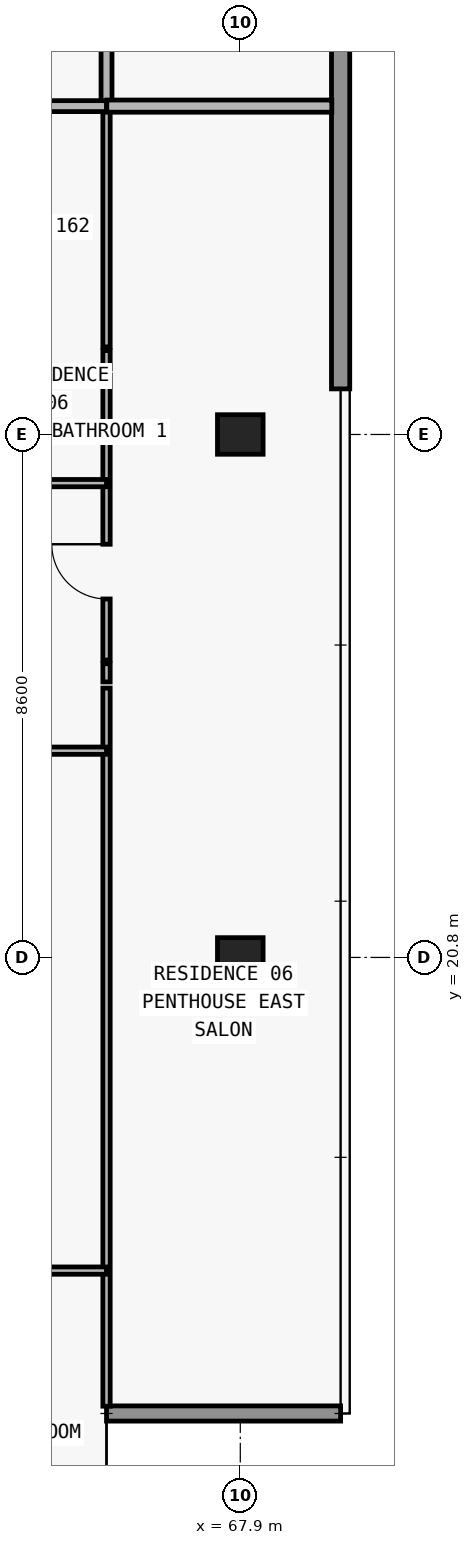
"""IFC4 building model, lengths in metres.
Left out: names, types, materials, properties, quantities, classifications, styles, units other than length and angle.
Written with IfcOpenShell. Run it as: python <this file> out.ifc"""

import sys

from ifc_helpers import new_model, si_unit, direction, frame, frame_2d, origin, origin_2d, place, context, subcontext, project, spatial, rectangle, extrude, element, fill, save


model = new_model("IFC4")
c1 = context("Model", 3, precision=1e-05, world=origin(), true_north=direction((0.0, 1.0)))
c2 = subcontext(c1, "Body", "Model", "MODEL_VIEW")
j1 = project(units=[si_unit("LENGTHUNIT", "METRE"), si_unit("PLANEANGLEUNIT", "RADIAN")], contexts=[c1])
p1 = place(None, origin())
s1 = spatial("IfcSite", under=j1, at=p1, CompositionType="ELEMENT")
p2 = place(p1, origin())
s2 = spatial("IfcBuilding", under=s1, at=p2, CompositionType="ELEMENT")
p3 = place(p2, frame((0.0, 0.0, 266.1)))
s3 = spatial("IfcBuildingStorey", under=s2, at=p3, CompositionType="ELEMENT", Elevation=266.1)
for number, where, z_axis, x_axis in (
    (1, (67.9, 20.8, 0.0), (0.0, 0.0, 1.0), (1.0, 0.0, 0.0)),
    (2, (67.9, 29.4, 0.0), (0.0, 0.0, 1.0), (1.0, 0.0, 0.0)),
):
    element("IfcColumn", number, at=place(p3, frame(where, z_axis=z_axis, x_axis=x_axis)), inside=s3, PredefinedType="COLUMN", context=c2, shape_type="SweptSolid", body=[
        extrude(rectangle(XDim=0.75, YDim=0.65, at=origin_2d()), origin(), (0.0, 0.0, 1.0), 3.0),
    ])
p4 = place(p3, frame((65.7, 13.3, 0.0), z_axis=(0.0, 0.0, 1.0), x_axis=(1.0, 0.0, 0.0)))
e3 = element("IfcWall", 3, at=p4, inside=s3, PredefinedType="ELEMENTEDWALL", context=c2, shape_type="SweptSolid", body=[
    extrude(rectangle(XDim=3.85, YDim=0.25, at=frame_2d((1.925, 0.0))), origin(), (0.0, 0.0, 1.0), 3.0),
])
p5 = place(p3, frame((69.55, 47.0, 0.0), z_axis=(0.0, 0.0, 1.0), x_axis=(0.0, -1.0, 0.0)))
e4 = element("IfcWall", 4, at=p5, inside=s3, PredefinedType="STANDARD", context=c2, shape_type="SweptSolid", body=[
    extrude(rectangle(XDim=16.85, YDim=0.3, at=frame_2d((8.425, 0.0))), origin(), (0.0, 0.0, 1.0), 3.0),
])
p6 = place(p3, frame((65.7, 13.42, 0.0), z_axis=(0.0, 0.0, 1.0), x_axis=(0.0, 1.0, 0.0)))
e5 = element("IfcWall", 5, at=p6, inside=s3, PredefinedType="PARTITIONING", context=c2, shape_type="SweptSolid", body=[
    extrude(rectangle(XDim=11.81, YDim=0.12, at=frame_2d((5.905, 0.0))), origin(), (0.0, 0.0, 1.0), 3.0),
])
p7 = place(p3, frame((65.7, 25.33, 0.0), z_axis=(0.0, 0.0, 1.0), x_axis=(0.0, 1.0, 0.0)))
e6 = element("IfcWall", 6, at=p7, inside=s3, PredefinedType="PARTITIONING", context=c2, shape_type="SweptSolid", body=[
    extrude(rectangle(XDim=0.3, YDim=0.12, at=frame_2d((0.15, 0.0))), origin(), (0.0, 0.0, 1.0), 3.0),
])
p8 = place(p3, frame((65.7, 25.69, 0.0), z_axis=(0.0, 0.0, 1.0), x_axis=(0.0, 1.0, 0.0)))
e7 = element("IfcWall", 7, at=p8, inside=s3, PredefinedType="PARTITIONING", context=c2, shape_type="SweptSolid", body=[
    extrude(rectangle(XDim=4.69, YDim=0.12, at=frame_2d((2.345, 0.0))), origin(), (0.0, 0.0, 1.0), 3.0),
])
p9 = place(p8, frame((1.005, 0.0, 0.0)))
e8 = element("IfcOpeningElement", 8, at=p9, cuts=e7, PredefinedType="OPENING", context=c2, shape_type="SweptSolid", body=[
    extrude(rectangle(XDim=0.9, YDim=2.15, at=frame_2d((0.45, 1.075))), frame((0.0, 0.07, 0.0), z_axis=(0.0, -1.0, 0.0), x_axis=(1.0, 0.0, 0.0)), (0.0, 0.0, 1.0), 0.14),
])
p10 = place(p3, frame((65.7, 30.48, 0.0), z_axis=(0.0, 0.0, 1.0), x_axis=(0.0, 1.0, 0.0)))
e9 = element("IfcWall", 9, at=p10, inside=s3, PredefinedType="PARTITIONING", context=c2, shape_type="SweptSolid", body=[
    extrude(rectangle(XDim=0.3, YDim=0.12, at=frame_2d((0.15, 0.0))), origin(), (0.0, 0.0, 1.0), 3.0),
])
p11 = place(p3, frame((65.7, 30.84, 0.0), z_axis=(0.0, 0.0, 1.0), x_axis=(0.0, 1.0, 0.0)))
e10 = element("IfcWall", 10, at=p11, inside=s3, PredefinedType="PARTITIONING", context=c2, shape_type="SweptSolid", body=[
    extrude(rectangle(XDim=3.96, YDim=0.12, at=frame_2d((1.98, 0.0))), origin(), (0.0, 0.0, 1.0), 3.0),
])
p12 = place(p3, frame((65.7, 34.805, 0.0), z_axis=(0.0, 0.0, 1.0), x_axis=(0.0, 1.0, 0.0)))
e11 = element("IfcWall", 11, at=p12, inside=s3, PredefinedType="PARTITIONING", context=c2, shape_type="SweptSolid", body=[
    extrude(rectangle(XDim=2.195, YDim=0.18, at=frame_2d((1.098, 0.0))), origin(), (0.0, 0.0, 1.0), 3.0),
])
p13 = place(p3, frame((59.5, 15.65, 0.0), z_axis=(0.0, 0.0, 1.0), x_axis=(1.0, 0.0, 0.0)))
e12 = element("IfcWall", 12, at=p13, inside=s3, PredefinedType="PARTITIONING", context=c2, shape_type="SweptSolid", body=[
    extrude(rectangle(XDim=6.2, YDim=0.12, at=frame_2d((3.1, 0.0))), origin(), (0.0, 0.0, 1.0), 3.0),
])
p14 = place(p13, frame((2.65, 0.0, 0.0)))
e13 = element("IfcOpeningElement", 13, at=p14, cuts=e12, PredefinedType="OPENING", context=c2, shape_type="SweptSolid", body=[
    extrude(rectangle(XDim=0.9, YDim=2.15, at=frame_2d((0.45, 1.075))), frame((0.0, 0.07, 0.0), z_axis=(0.0, -1.0, 0.0), x_axis=(1.0, 0.0, 0.0)), (0.0, 0.0, 1.0), 0.14),
])
p15 = place(p3, frame((59.505, 24.2, 0.0), z_axis=(0.0, 0.0, 1.0), x_axis=(1.0, 0.0, 0.0)))
e14 = element("IfcWall", 14, at=p15, inside=s3, PredefinedType="PARTITIONING", context=c2, shape_type="SweptSolid", body=[
    extrude(rectangle(XDim=6.195, YDim=0.12, at=frame_2d((3.098, 0.0))), origin(), (0.0, 0.0, 1.0), 3.0),
])
p16 = place(p15, frame((2.647, 0.0, 0.0)))
e15 = element("IfcOpeningElement", 15, at=p16, cuts=e14, PredefinedType="OPENING", context=c2, shape_type="SweptSolid", body=[
    extrude(rectangle(XDim=0.9, YDim=2.15, at=frame_2d((0.45, 1.075))), frame((0.0, 0.07, 0.0), z_axis=(0.0, -1.0, 0.0), x_axis=(1.0, 0.0, 0.0)), (0.0, 0.0, 1.0), 0.14),
])
p17 = place(p3, frame((59.5, 28.6, 0.0), z_axis=(0.0, 0.0, 1.0), x_axis=(1.0, 0.0, 0.0)))
e16 = element("IfcWall", 16, at=p17, inside=s3, PredefinedType="PARTITIONING", context=c2, shape_type="SweptSolid", body=[
    extrude(rectangle(XDim=6.2, YDim=0.12, at=frame_2d((3.1, 0.0))), origin(), (0.0, 0.0, 1.0), 3.0),
])
p18 = place(p17, frame((1.835, 0.0, 0.0)))
e17 = element("IfcOpeningElement", 17, at=p18, cuts=e16, PredefinedType="OPENING", context=c2, shape_type="SweptSolid", body=[
    extrude(rectangle(XDim=0.9, YDim=2.15, at=frame_2d((0.45, 1.075))), frame((0.0, 0.07, 0.0), z_axis=(0.0, -1.0, 0.0), x_axis=(1.0, 0.0, 0.0)), (0.0, 0.0, 1.0), 0.14),
])
p19 = place(p3, frame((31.5, 34.8, 0.0), z_axis=(0.0, 0.0, 1.0), x_axis=(1.0, 0.0, 0.0)))
e18 = element("IfcWall", 18, at=p19, inside=s3, PredefinedType="PARTITIONING", context=c2, shape_type="SweptSolid", body=[
    extrude(rectangle(XDim=34.2, YDim=0.18, at=frame_2d((17.1, 0.0))), origin(), (0.0, 0.0, 1.0), 3.0),
])
p20 = place(p19, frame((5.6, 0.0, 0.0)))
e19 = element("IfcOpeningElement", 19, at=p20, cuts=e18, PredefinedType="OPENING", context=c2, shape_type="SweptSolid", body=[
    extrude(rectangle(XDim=1.0, YDim=2.2, at=frame_2d((0.5, 1.1))), frame((0.0, 0.1, 0.0), z_axis=(0.0, -1.0, 0.0), x_axis=(1.0, 0.0, 0.0)), (0.0, 0.0, 1.0), 0.2),
])
p21 = place(p19, frame((13.799, 0.0, 0.0)))
e20 = element("IfcOpeningElement", 20, at=p21, cuts=e18, PredefinedType="OPENING", context=c2, shape_type="SweptSolid", body=[
    extrude(rectangle(XDim=1.0, YDim=2.2, at=frame_2d((0.5, 1.1))), frame((0.0, 0.1, 0.0), z_axis=(0.0, -1.0, 0.0), x_axis=(1.0, 0.0, 0.0)), (0.0, 0.0, 1.0), 0.2),
])
p22 = place(p19, frame((22.483, 0.0, 0.0)))
e21 = element("IfcOpeningElement", 21, at=p22, cuts=e18, PredefinedType="OPENING", context=c2, shape_type="SweptSolid", body=[
    extrude(rectangle(XDim=1.0, YDim=2.2, at=frame_2d((0.5, 1.1))), frame((0.0, 0.1, 0.0), z_axis=(0.0, -1.0, 0.0), x_axis=(1.0, 0.0, 0.0)), (0.0, 0.0, 1.0), 0.2),
])
p23 = place(p3, frame((65.705, 34.8, 0.0), z_axis=(0.0, 0.0, 1.0), x_axis=(1.0, 0.0, 0.0)))
e22 = element("IfcWall", 22, at=p23, inside=s3, PredefinedType="PARTITIONING", context=c2, shape_type="SweptSolid", body=[
    extrude(rectangle(XDim=3.7, YDim=0.2, at=frame_2d((1.85, 0.0))), origin(), (0.0, 0.0, 1.0), 3.0),
])
p24 = place(p9, origin())
e23 = element("IfcDoor", 23, at=p24, inside=s3, OperationType="SINGLE_SWING_RIGHT", PredefinedType="DOOR", context=c2, shape_type="SweptSolid", body=[
    extrude(rectangle(XDim=0.9, YDim=2.15, at=frame_2d((0.45, 1.075))), frame((0.0, 0.025, 0.0), z_axis=(0.0, -1.0, 0.0), x_axis=(1.0, 0.0, 0.0)), (0.0, 0.0, 1.0), 0.05),
])
fill(e8, e23)
save(model, sys.argv[1])
